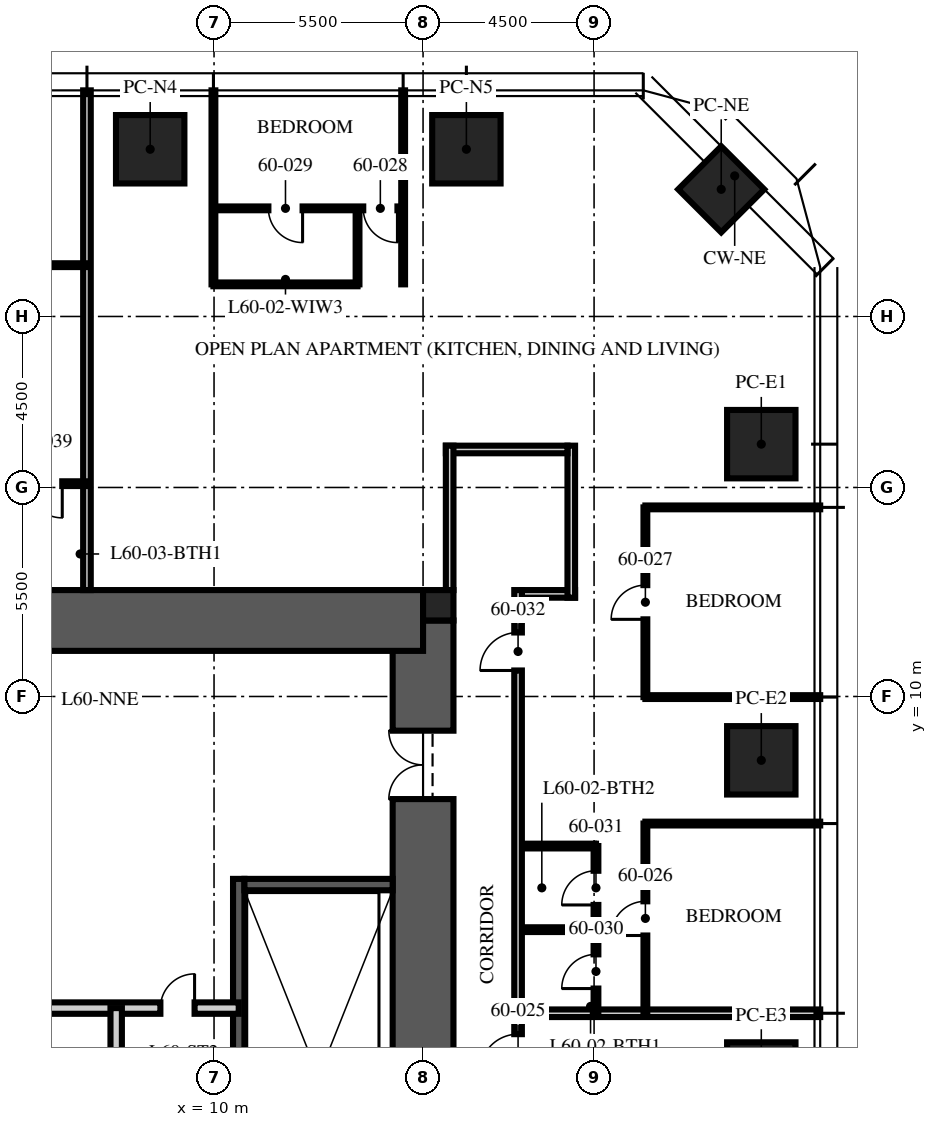
"""IFC4 building model, lengths in metres.
Left out: names, types, materials, properties, quantities, classifications, styles, units other than length and angle.
Written with IfcOpenShell. Run it as: python <this file> out.ifc"""

import sys

from ifc_helpers import new_model, si_unit, direction, frame, frame_2d, origin, origin_2d, place, context, subcontext, project, spatial, rectangle, extrude, element, fill, save


model = new_model("IFC4")
c1 = context("Model", 3, precision=1e-05, world=origin(), true_north=direction((0.0, 1.0)))
c2 = subcontext(c1, "Body", "Model", "MODEL_VIEW")
j1 = project(units=[si_unit("LENGTHUNIT", "METRE"), si_unit("PLANEANGLEUNIT", "RADIAN")], contexts=[c1])
p1 = place(None, origin())
s1 = spatial("IfcSite", under=j1, at=p1, CompositionType="ELEMENT")
p2 = place(p1, origin())
s2 = spatial("IfcBuilding", under=s1, at=p2, CompositionType="ELEMENT")
p3 = place(p2, frame((0.0, 0.0, 240.75)))
s3 = spatial("IfcBuildingStorey", under=s2, at=p3, CompositionType="ELEMENT", Elevation=240.75)
p4 = place(p3, frame((15.5, -12.0, -0.25), z_axis=(0.0, 0.0, 1.0), x_axis=(0.0, 1.0, 0.0)))
e1 = element("IfcWall", 1, at=p4, inside=s3, PredefinedType="SHEAR", context=c2, shape_type="SweptSolid", body=[
    extrude(rectangle(XDim=24.0, YDim=1.6, at=frame_2d((12.0, 0.0))), origin(), (0.0, 0.0, 1.0), 3.75),
])
p5 = place(p4, frame((3.2, 0.0, 0.25)))
e2 = element("IfcOpeningElement", 2, at=p5, cuts=e1, PredefinedType="OPENING", context=c2, shape_type="SweptSolid", body=[
    extrude(rectangle(XDim=1.2, YDim=2.1, at=frame_2d((0.6, 1.05))), frame((0.0, 0.81, 0.0), z_axis=(0.0, -1.0, 0.0), x_axis=(1.0, 0.0, 0.0)), (0.0, 0.0, 1.0), 1.62),
])
p6 = place(p4, frame((19.3, 0.0, 0.25)))
e3 = element("IfcOpeningElement", 3, at=p6, cuts=e1, PredefinedType="OPENING", context=c2, shape_type="SweptSolid", body=[
    extrude(rectangle(XDim=1.8, YDim=2.1, at=frame_2d((0.9, 1.05))), frame((0.0, 0.81, 0.0), z_axis=(0.0, -1.0, 0.0), x_axis=(1.0, 0.0, 0.0)), (0.0, 0.0, 1.0), 1.62),
])
p7 = place(p3, frame((-15.5, 12.0, -0.25), z_axis=(0.0, 0.0, 1.0), x_axis=(1.0, 0.0, 0.0)))
e4 = element("IfcWall", 4, at=p7, inside=s3, PredefinedType="SHEAR", context=c2, shape_type="SweptSolid", body=[
    extrude(rectangle(XDim=31.0, YDim=1.6, at=frame_2d((15.5, 0.0))), origin(), (0.0, 0.0, 1.0), 3.75),
])
p8 = place(p3, frame((15.9, 12.4, -0.25), z_axis=(0.0, 0.0, 1.0), x_axis=(1.0, 0.0, 0.0)))
e5 = element("IfcColumn", 5, at=p8, inside=s3, PredefinedType="COLUMN", context=c2, shape_type="SweptSolid", body=[
    extrude(rectangle(XDim=0.8, YDim=0.8, at=origin_2d()), origin(), (0.0, 0.0, 1.0), 3.75),
])
for number, where, z_axis, x_axis in (
    (6, (8.32, 24.4, 0.0), (0.0, 0.0, 1.0), (1.0, 0.0, 0.0)),
    (7, (16.64, 24.4, 0.0), (0.0, 0.0, 1.0), (1.0, 0.0, 0.0)),
    (8, (24.4, 16.64, 0.0), (0.0, 0.0, 1.0), (0.0, 1.0, 0.0)),
    (9, (24.4, 8.32, 0.0), (0.0, 0.0, 1.0), (0.0, 1.0, 0.0)),
    (10, (24.4, 0.0, 0.0), (0.0, 0.0, 1.0), (0.0, 1.0, 0.0)),
):
    element("IfcColumn", number, at=place(p3, frame(where, z_axis=z_axis, x_axis=x_axis)), inside=s3, PredefinedType="COLUMN", context=c2, shape_type="SweptSolid", body=[
        extrude(rectangle(XDim=1.8, YDim=1.8, at=origin_2d()), origin(), (0.0, 0.0, 1.0), 3.75),
    ])
p9 = place(p3, frame((23.346, 23.346, 0.0), z_axis=(0.0, 0.0, 1.0), x_axis=(0.707106781187, -0.707106781187, 0.0)))
e11 = element("IfcColumn", 11, at=p9, inside=s3, PredefinedType="COLUMN", context=c2, shape_type="SweptSolid", body=[
    extrude(rectangle(XDim=1.6, YDim=1.6, at=origin_2d()), origin(), (0.0, 0.0, 1.0), 3.75),
])
p10 = place(p3, frame((10.65, -4.9, 0.0), z_axis=(0.0, 0.0, 1.0), x_axis=(0.0, 1.0, 0.0)))
e12 = element("IfcWall", 12, at=p10, inside=s3, PredefinedType="SOLIDWALL", context=c2, shape_type="SweptSolid", body=[
    extrude(rectangle(XDim=10.1, YDim=0.3, at=frame_2d((5.05, 0.0))), origin(), (0.0, 0.0, 1.0), 3.5),
])
p11 = place(p3, frame((14.7, 5.05, 0.0), z_axis=(0.0, 0.0, 1.0), x_axis=(-1.0, 0.0, 0.0)))
e13 = element("IfcWall", 13, at=p11, inside=s3, PredefinedType="SOLIDWALL", context=c2, shape_type="SweptSolid", body=[
    extrude(rectangle(XDim=3.9, YDim=0.3, at=frame_2d((1.95, 0.0))), origin(), (0.0, 0.0, 1.0), 3.5),
])
p12 = place(p3, frame((-10.65, 1.8, 0.0), z_axis=(0.0, 0.0, 1.0), x_axis=(1.0, 0.0, 0.0)))
e14 = element("IfcWall", 14, at=p12, inside=s3, PredefinedType="PARTITIONING", context=c2, shape_type="SweptSolid", body=[
    extrude(rectangle(XDim=21.3, YDim=0.3, at=frame_2d((10.65, 0.0))), origin(), (0.0, 0.0, 1.0), 3.5),
])
p13 = place(p12, frame((10.05, 0.0, 0.0)))
e15 = element("IfcOpeningElement", 15, at=p13, cuts=e14, PredefinedType="OPENING", context=c2, shape_type="SweptSolid", body=[
    extrude(rectangle(XDim=1.2, YDim=2.1, at=frame_2d((0.6, 1.05))), frame((0.0, 0.16, 0.0), z_axis=(0.0, -1.0, 0.0), x_axis=(1.0, 0.0, 0.0)), (0.0, 0.0, 1.0), 0.32),
])
p14 = place(p12, frame((19.238, 0.0, 0.0)))
e16 = element("IfcOpeningElement", 16, at=p14, cuts=e14, PredefinedType="OPENING", context=c2, shape_type="SweptSolid", body=[
    extrude(rectangle(XDim=0.9, YDim=2.1, at=frame_2d((0.45, 1.05))), frame((0.0, 0.16, 0.0), z_axis=(0.0, -1.0, 0.0), x_axis=(1.0, 0.0, 0.0)), (0.0, 0.0, 1.0), 0.32),
])
p15 = place(p3, frame((7.425, -2.848, 0.0), z_axis=(0.0, 0.0, 1.0), x_axis=(0.0, 1.0, 0.0)))
e17 = element("IfcWall", 17, at=p15, inside=s3, PredefinedType="PARTITIONING", context=c2, shape_type="SweptSolid", body=[
    extrude(rectangle(XDim=4.648, YDim=0.3, at=frame_2d((2.324, 0.0))), origin(), (0.0, 0.0, 1.0), 3.5),
])
p16 = place(p3, frame((18.1, 12.7, 0.0), z_axis=(0.0, 0.0, 1.0), x_axis=(1.0, 0.0, 0.0)))
e18 = element("IfcWall", 18, at=p16, inside=s3, PredefinedType="PARTITIONING", context=c2, shape_type="SweptSolid", body=[
    extrude(rectangle(XDim=1.4, YDim=0.2, at=frame_2d((0.7, 0.0))), origin(), (0.0, 0.0, 1.0), 2.81),
])
p17 = place(p3, frame((19.4, 12.6, 0.0), z_axis=(0.0, 0.0, 1.0), x_axis=(0.0, 1.0, 0.0)))
e19 = element("IfcWall", 19, at=p17, inside=s3, PredefinedType="PARTITIONING", context=c2, shape_type="SweptSolid", body=[
    extrude(rectangle(XDim=4.0, YDim=0.2, at=frame_2d((2.0, 0.0))), origin(), (0.0, 0.0, 1.0), 2.6),
])
p18 = place(p3, frame((19.3, 16.5, 0.0), z_axis=(0.0, 0.0, 1.0), x_axis=(-1.0, 0.0, 0.0)))
e20 = element("IfcWall", 20, at=p18, inside=s3, PredefinedType="PARTITIONING", context=c2, shape_type="SweptSolid", body=[
    extrude(rectangle(XDim=3.2, YDim=0.2, at=frame_2d((1.6, 0.0))), origin(), (0.0, 0.0, 1.0), 2.3),
])
p19 = place(p3, frame((16.2, 16.6, 0.0), z_axis=(0.0, 0.0, 1.0), x_axis=(0.0, -1.0, 0.0)))
e21 = element("IfcWall", 21, at=p19, inside=s3, PredefinedType="PARTITIONING", context=c2, shape_type="SweptSolid", body=[
    extrude(rectangle(XDim=3.8, YDim=0.2, at=frame_2d((1.9, 0.0))), origin(), (0.0, 0.0, 1.0), 2.3),
])
p20 = place(p3, frame((18.1, 1.664, 0.0), z_axis=(0.0, 0.0, 1.0), x_axis=(1.0, 0.0, 0.0)))
e22 = element("IfcWall", 22, at=p20, inside=s3, PredefinedType="PARTITIONING", context=c2, shape_type="SweptSolid", body=[
    extrude(rectangle(XDim=7.85, YDim=0.2, at=frame_2d((3.925, 0.0))), origin(), (0.0, 0.0, 1.0), 2.91),
])
for number, where, z_axis, x_axis in (
    (23, (21.35, 6.656, 0.0), (0.0, 0.0, 1.0), (1.0, 0.0, 0.0)),
    (24, (21.35, 9.984, 0.0), (0.0, 0.0, 1.0), (1.0, 0.0, 0.0)),
    (25, (21.35, 14.976, 0.0), (0.0, 0.0, 1.0), (1.0, 0.0, 0.0)),
):
    element("IfcWall", number, at=place(p3, frame(where, z_axis=z_axis, x_axis=x_axis)), inside=s3, PredefinedType="PARTITIONING", context=c2, shape_type="SweptSolid", body=[
        extrude(rectangle(XDim=4.6, YDim=0.1, at=frame_2d((2.3, 0.0))), origin(), (0.0, 0.0, 1.0), 2.91),
    ])
for number, where, z_axis, x_axis in (
    (26, (14.976, 20.845, 0.0), (0.0, 0.0, 1.0), (0.0, 1.0, 0.0)),
    (27, (9.984, 20.845, 0.0), (0.0, 0.0, 1.0), (0.0, 1.0, 0.0)),
):
    element("IfcWall", number, at=place(p3, frame(where, z_axis=z_axis, x_axis=x_axis)), inside=s3, PredefinedType="PARTITIONING", context=c2, shape_type="SweptSolid", body=[
        extrude(rectangle(XDim=5.105, YDim=0.1, at=frame_2d((2.552, 0.0))), origin(), (0.0, 0.0, 1.0), 2.91),
    ])
p21 = place(p3, frame((6.656, 12.8, 0.0), z_axis=(0.0, 0.0, 1.0), x_axis=(0.0, 1.0, 0.0)))
e28 = element("IfcWall", 28, at=p21, inside=s3, PredefinedType="PARTITIONING", context=c2, shape_type="SweptSolid", body=[
    extrude(rectangle(XDim=13.15, YDim=0.2, at=frame_2d((6.575, 0.0))), origin(), (0.0, 0.0, 1.0), 2.91),
])
p22 = place(p3, frame((21.35, 1.664, 0.0), z_axis=(0.0, 0.0, 1.0), x_axis=(0.0, 1.0, 0.0)))
e29 = element("IfcWall", 29, at=p22, inside=s3, PredefinedType="PARTITIONING", context=c2, shape_type="SweptSolid", body=[
    extrude(rectangle(XDim=4.992, YDim=0.1, at=frame_2d((2.496, 0.0))), origin(), (0.0, 0.0, 1.0), 2.81),
])
p23 = place(p22, frame((2.046, 0.0, 0.0)))
e30 = element("IfcOpeningElement", 30, at=p23, cuts=e29, PredefinedType="OPENING", context=c2, shape_type="SweptSolid", body=[
    extrude(rectangle(XDim=0.9, YDim=2.1, at=frame_2d((0.45, 1.05))), frame((0.0, 0.06, 0.0), z_axis=(0.0, -1.0, 0.0), x_axis=(1.0, 0.0, 0.0)), (0.0, 0.0, 1.0), 0.12),
])
p24 = place(p3, frame((21.35, 9.984, 0.0), z_axis=(0.0, 0.0, 1.0), x_axis=(0.0, 1.0, 0.0)))
e31 = element("IfcWall", 31, at=p24, inside=s3, PredefinedType="PARTITIONING", context=c2, shape_type="SweptSolid", body=[
    extrude(rectangle(XDim=4.992, YDim=0.1, at=frame_2d((2.496, 0.0))), origin(), (0.0, 0.0, 1.0), 2.81),
])
p25 = place(p24, frame((2.046, 0.0, 0.0)))
e32 = element("IfcOpeningElement", 32, at=p25, cuts=e31, PredefinedType="OPENING", context=c2, shape_type="SweptSolid", body=[
    extrude(rectangle(XDim=0.9, YDim=2.1, at=frame_2d((0.45, 1.05))), frame((0.0, 0.06, 0.0), z_axis=(0.0, -1.0, 0.0), x_axis=(1.0, 0.0, 0.0)), (0.0, 0.0, 1.0), 0.12),
])
p26 = place(p3, frame((14.976, 22.845, 0.0), z_axis=(0.0, 0.0, 1.0), x_axis=(-1.0, 0.0, 0.0)))
e33 = element("IfcWall", 33, at=p26, inside=s3, PredefinedType="PARTITIONING", context=c2, shape_type="SweptSolid", body=[
    extrude(rectangle(XDim=4.992, YDim=0.1, at=frame_2d((2.496, 0.0))), origin(), (0.0, 0.0, 1.0), 2.81),
])
p27 = place(p26, frame((0.15, 0.0, 0.0)))
e34 = element("IfcOpeningElement", 34, at=p27, cuts=e33, PredefinedType="OPENING", context=c2, shape_type="SweptSolid", body=[
    extrude(rectangle(XDim=0.9, YDim=2.1, at=frame_2d((0.45, 1.05))), frame((0.0, 0.06, 0.0), z_axis=(0.0, -1.0, 0.0), x_axis=(1.0, 0.0, 0.0)), (0.0, 0.0, 1.0), 0.12),
])
p28 = place(p26, frame((2.646, 0.0, 0.0)))
e35 = element("IfcOpeningElement", 35, at=p28, cuts=e33, PredefinedType="OPENING", context=c2, shape_type="SweptSolid", body=[
    extrude(rectangle(XDim=0.9, YDim=2.1, at=frame_2d((0.45, 1.05))), frame((0.0, 0.06, 0.0), z_axis=(0.0, -1.0, 0.0), x_axis=(1.0, 0.0, 0.0)), (0.0, 0.0, 1.0), 0.12),
])
p29 = place(p3, frame((13.776, 20.845, 0.0), z_axis=(0.0, 0.0, 1.0), x_axis=(0.0, 1.0, 0.0)))
e36 = element("IfcWall", 36, at=p29, inside=s3, PredefinedType="PARTITIONING", context=c2, shape_type="SweptSolid", body=[
    extrude(rectangle(XDim=2.0, YDim=0.1, at=frame_2d((1.0, 0.0))), origin(), (0.0, 0.0, 1.0), 3.5),
])
p30 = place(p3, frame((13.776, 20.845, 0.0), z_axis=(0.0, 0.0, 1.0), x_axis=(-1.0, 0.0, 0.0)))
e37 = element("IfcWall", 37, at=p30, inside=s3, PredefinedType="PARTITIONING", context=c2, shape_type="SweptSolid", body=[
    extrude(rectangle(XDim=3.792, YDim=0.1, at=frame_2d((1.896, 0.0))), origin(), (0.0, 0.0, 1.0), 2.81),
])
p31 = place(p3, frame((20.05, 1.664, 0.0), z_axis=(0.0, 0.0, 1.0), x_axis=(0.0, 1.0, 0.0)))
e38 = element("IfcWall", 38, at=p31, inside=s3, PredefinedType="PARTITIONING", context=c2, shape_type="SweptSolid", body=[
    extrude(rectangle(XDim=4.4, YDim=0.125, at=frame_2d((2.2, 0.0))), origin(), (0.0, 0.0, 1.0), 2.81),
])
p32 = place(p31, frame((0.65, 0.0, 0.0)))
e39 = element("IfcOpeningElement", 39, at=p32, cuts=e38, PredefinedType="OPENING", context=c2, shape_type="SweptSolid", body=[
    extrude(rectangle(XDim=0.9, YDim=2.1, at=frame_2d((0.45, 1.05))), frame((0.0, 0.073, 0.0), z_axis=(0.0, -1.0, 0.0), x_axis=(1.0, 0.0, 0.0)), (0.0, 0.0, 1.0), 0.145),
])
p33 = place(p31, frame((2.85, 0.0, 0.0)))
e40 = element("IfcOpeningElement", 40, at=p33, cuts=e38, PredefinedType="OPENING", context=c2, shape_type="SweptSolid", body=[
    extrude(rectangle(XDim=0.9, YDim=2.1, at=frame_2d((0.45, 1.05))), frame((0.0, 0.073, 0.0), z_axis=(0.0, -1.0, 0.0), x_axis=(1.0, 0.0, 0.0)), (0.0, 0.0, 1.0), 0.145),
])
for number, where, z_axis, x_axis in (
    (41, (18.1, 3.864, 0.0), (0.0, 0.0, 1.0), (1.0, 0.0, 0.0)),
    (42, (18.1, 6.064, 0.0), (0.0, 0.0, 1.0), (1.0, 0.0, 0.0)),
):
    element("IfcWall", number, at=place(p3, frame(where, z_axis=z_axis, x_axis=x_axis)), inside=s3, PredefinedType="PARTITIONING", context=c2, shape_type="SweptSolid", body=[
        extrude(rectangle(XDim=1.95, YDim=0.125, at=frame_2d((0.975, 0.0))), origin(), (0.0, 0.0, 1.0), 3.5),
    ])
p34 = place(p3, frame((6.656, 21.35, 0.0), z_axis=(0.0, 0.0, 1.0), x_axis=(-1.0, 0.0, 0.0)))
e43 = element("IfcWall", 43, at=p34, inside=s3, PredefinedType="PARTITIONING", context=c2, shape_type="SweptSolid", body=[
    extrude(rectangle(XDim=4.992, YDim=0.1, at=frame_2d((2.496, 0.0))), origin(), (0.0, 0.0, 1.0), 2.81),
])
p35 = place(p34, frame((2.046, 0.0, 0.0)))
e44 = element("IfcOpeningElement", 44, at=p35, cuts=e43, PredefinedType="OPENING", context=c2, shape_type="SweptSolid", body=[
    extrude(rectangle(XDim=0.9, YDim=2.1, at=frame_2d((0.45, 1.05))), frame((0.0, 0.06, 0.0), z_axis=(0.0, -1.0, 0.0), x_axis=(1.0, 0.0, 0.0)), (0.0, 0.0, 1.0), 0.12),
])
p36 = place(p3, frame((6.656, 15.6, 0.0), z_axis=(0.0, 0.0, 1.0), x_axis=(-1.0, 0.0, 0.0)))
e45 = element("IfcWall", 45, at=p36, inside=s3, PredefinedType="PARTITIONING", context=c2, shape_type="SweptSolid", body=[
    extrude(rectangle(XDim=4.0, YDim=0.125, at=frame_2d((2.0, 0.0))), origin(), (0.0, 0.0, 1.0), 2.81),
])
p37 = place(p36, frame((0.65, 0.0, 0.0)))
e46 = element("IfcOpeningElement", 46, at=p37, cuts=e45, PredefinedType="OPENING", context=c2, shape_type="SweptSolid", body=[
    extrude(rectangle(XDim=0.9, YDim=2.1, at=frame_2d((0.45, 1.05))), frame((0.0, 0.073, 0.0), z_axis=(0.0, -1.0, 0.0), x_axis=(1.0, 0.0, 0.0)), (0.0, 0.0, 1.0), 0.145),
])
p38 = place(p36, frame((2.65, 0.0, 0.0)))
e47 = element("IfcOpeningElement", 47, at=p38, cuts=e45, PredefinedType="OPENING", context=c2, shape_type="SweptSolid", body=[
    extrude(rectangle(XDim=0.9, YDim=2.1, at=frame_2d((0.45, 1.05))), frame((0.0, 0.073, 0.0), z_axis=(0.0, -1.0, 0.0), x_axis=(1.0, 0.0, 0.0)), (0.0, 0.0, 1.0), 0.145),
])
p39 = place(p3, frame((18.0, -13.0, 0.0), z_axis=(0.0, 0.0, 1.0), x_axis=(0.0, 1.0, 0.0)))
e48 = element("IfcWall", 48, at=p39, inside=s3, PredefinedType="PARTITIONING", context=c2, shape_type="SweptSolid", body=[
    extrude(rectangle(XDim=25.8, YDim=0.2, at=frame_2d((12.9, 0.0))), origin(), (0.0, 0.0, 1.0), 2.6),
])
p40 = place(p39, frame((13.114, 0.0, 0.0)))
e49 = element("IfcOpeningElement", 49, at=p40, cuts=e48, PredefinedType="OPENING", context=c2, shape_type="SweptSolid", body=[
    extrude(rectangle(XDim=1.0, YDim=2.2, at=frame_2d((0.5, 1.1))), frame((0.0, 0.11, 0.0), z_axis=(0.0, -1.0, 0.0), x_axis=(1.0, 0.0, 0.0)), (0.0, 0.0, 1.0), 0.22),
])
p41 = place(p39, frame((23.684, 0.0, 0.0)))
e50 = element("IfcOpeningElement", 50, at=p41, cuts=e48, PredefinedType="OPENING", context=c2, shape_type="SweptSolid", body=[
    extrude(rectangle(XDim=1.0, YDim=2.2, at=frame_2d((0.5, 1.1))), frame((0.0, 0.11, 0.0), z_axis=(0.0, -1.0, 0.0), x_axis=(1.0, 0.0, 0.0)), (0.0, 0.0, 1.0), 0.22),
])
p42 = place(p39, frame((4.6, 0.0, 0.0)))
e51 = element("IfcOpeningElement", 51, at=p42, cuts=e48, PredefinedType="OPENING", context=c2, shape_type="SweptSolid", body=[
    extrude(rectangle(XDim=1.0, YDim=2.2, at=frame_2d((0.5, 1.1))), frame((0.0, 0.11, 0.0), z_axis=(0.0, -1.0, 0.0), x_axis=(1.0, 0.0, 0.0)), (0.0, 0.0, 1.0), 0.22),
])
p43 = place(p6, origin())
e52 = element("IfcDoor", 52, at=p43, inside=s3, OperationType="DOUBLE_DOOR_SINGLE_SWING", PredefinedType="DOOR", context=c2, shape_type="SweptSolid", body=[
    extrude(rectangle(XDim=1.8, YDim=2.1, at=frame_2d((0.9, 1.05))), frame((0.0, 0.025, 0.0), z_axis=(0.0, -1.0, 0.0), x_axis=(1.0, 0.0, 0.0)), (0.0, 0.0, 1.0), 0.05),
])
fill(e3, e52)
p44 = place(p14, origin())
e53 = element("IfcDoor", 53, at=p44, inside=s3, OperationType="SINGLE_SWING_RIGHT", PredefinedType="DOOR", context=c2, shape_type="SweptSolid", body=[
    extrude(rectangle(XDim=0.9, YDim=2.1, at=frame_2d((0.45, 1.05))), frame((0.0, 0.025, 0.0), z_axis=(0.0, -1.0, 0.0), x_axis=(1.0, 0.0, 0.0)), (0.0, 0.0, 1.0), 0.05),
])
fill(e16, e53)
p45 = place(p40, origin())
e54 = element("IfcDoor", 54, at=p45, inside=s3, OperationType="SINGLE_SWING_LEFT", PredefinedType="DOOR", context=c2, shape_type="SweptSolid", body=[
    extrude(rectangle(XDim=1.0, YDim=2.2, at=frame_2d((0.5, 1.1))), frame((0.0, 0.025, 0.0), z_axis=(0.0, -1.0, 0.0), x_axis=(1.0, 0.0, 0.0)), (0.0, 0.0, 1.0), 0.05),
])
fill(e49, e54)
p46 = place(p23, origin())
e55 = element("IfcDoor", 55, at=p46, inside=s3, OperationType="SINGLE_SWING_LEFT", PredefinedType="DOOR", context=c2, shape_type="SweptSolid", body=[
    extrude(rectangle(XDim=0.9, YDim=2.1, at=frame_2d((0.45, 1.05))), frame((0.0, 0.025, 0.0), z_axis=(0.0, -1.0, 0.0), x_axis=(1.0, 0.0, 0.0)), (0.0, 0.0, 1.0), 0.05),
])
fill(e30, e55)
p47 = place(p25, origin())
e56 = element("IfcDoor", 56, at=p47, inside=s3, OperationType="SINGLE_SWING_LEFT", PredefinedType="DOOR", context=c2, shape_type="SweptSolid", body=[
    extrude(rectangle(XDim=0.9, YDim=2.1, at=frame_2d((0.45, 1.05))), frame((0.0, 0.025, 0.0), z_axis=(0.0, -1.0, 0.0), x_axis=(1.0, 0.0, 0.0)), (0.0, 0.0, 1.0), 0.05),
])
fill(e32, e56)
p48 = place(p27, origin())
e57 = element("IfcDoor", 57, at=p48, inside=s3, OperationType="SINGLE_SWING_LEFT", PredefinedType="DOOR", context=c2, shape_type="SweptSolid", body=[
    extrude(rectangle(XDim=0.9, YDim=2.1, at=frame_2d((0.45, 1.05))), frame((0.0, 0.025, 0.0), z_axis=(0.0, -1.0, 0.0), x_axis=(1.0, 0.0, 0.0)), (0.0, 0.0, 1.0), 0.05),
])
fill(e34, e57)
p49 = place(p28, origin())
e58 = element("IfcDoor", 58, at=p49, inside=s3, OperationType="SINGLE_SWING_LEFT", PredefinedType="DOOR", context=c2, shape_type="SweptSolid", body=[
    extrude(rectangle(XDim=0.9, YDim=2.1, at=frame_2d((0.45, 1.05))), frame((0.0, 0.025, 0.0), z_axis=(0.0, -1.0, 0.0), x_axis=(1.0, 0.0, 0.0)), (0.0, 0.0, 1.0), 0.05),
])
fill(e35, e58)
p50 = place(p32, origin())
e59 = element("IfcDoor", 59, at=p50, inside=s3, OperationType="SINGLE_SWING_LEFT", PredefinedType="DOOR", context=c2, shape_type="SweptSolid", body=[
    extrude(rectangle(XDim=0.9, YDim=2.1, at=frame_2d((0.45, 1.05))), frame((0.0, 0.025, 0.0), z_axis=(0.0, -1.0, 0.0), x_axis=(1.0, 0.0, 0.0)), (0.0, 0.0, 1.0), 0.05),
])
fill(e39, e59)
p51 = place(p33, origin())
e60 = element("IfcDoor", 60, at=p51, inside=s3, OperationType="SINGLE_SWING_LEFT", PredefinedType="DOOR", context=c2, shape_type="SweptSolid", body=[
    extrude(rectangle(XDim=0.9, YDim=2.1, at=frame_2d((0.45, 1.05))), frame((0.0, 0.025, 0.0), z_axis=(0.0, -1.0, 0.0), x_axis=(1.0, 0.0, 0.0)), (0.0, 0.0, 1.0), 0.05),
])
fill(e40, e60)
p52 = place(p41, origin())
e61 = element("IfcDoor", 61, at=p52, inside=s3, OperationType="SINGLE_SWING_LEFT", PredefinedType="DOOR", context=c2, shape_type="SweptSolid", body=[
    extrude(rectangle(XDim=1.0, YDim=2.2, at=frame_2d((0.5, 1.1))), frame((0.0, 0.025, 0.0), z_axis=(0.0, -1.0, 0.0), x_axis=(1.0, 0.0, 0.0)), (0.0, 0.0, 1.0), 0.05),
])
fill(e50, e61)
p53 = place(p37, origin())
e62 = element("IfcDoor", 62, at=p53, inside=s3, OperationType="SINGLE_SWING_LEFT", PredefinedType="DOOR", context=c2, shape_type="SweptSolid", body=[
    extrude(rectangle(XDim=0.9, YDim=2.1, at=frame_2d((0.45, 1.05))), frame((0.0, 0.025, 0.0), z_axis=(0.0, -1.0, 0.0), x_axis=(1.0, 0.0, 0.0)), (0.0, 0.0, 1.0), 0.05),
])
fill(e46, e62)
save(model, sys.argv[1])
